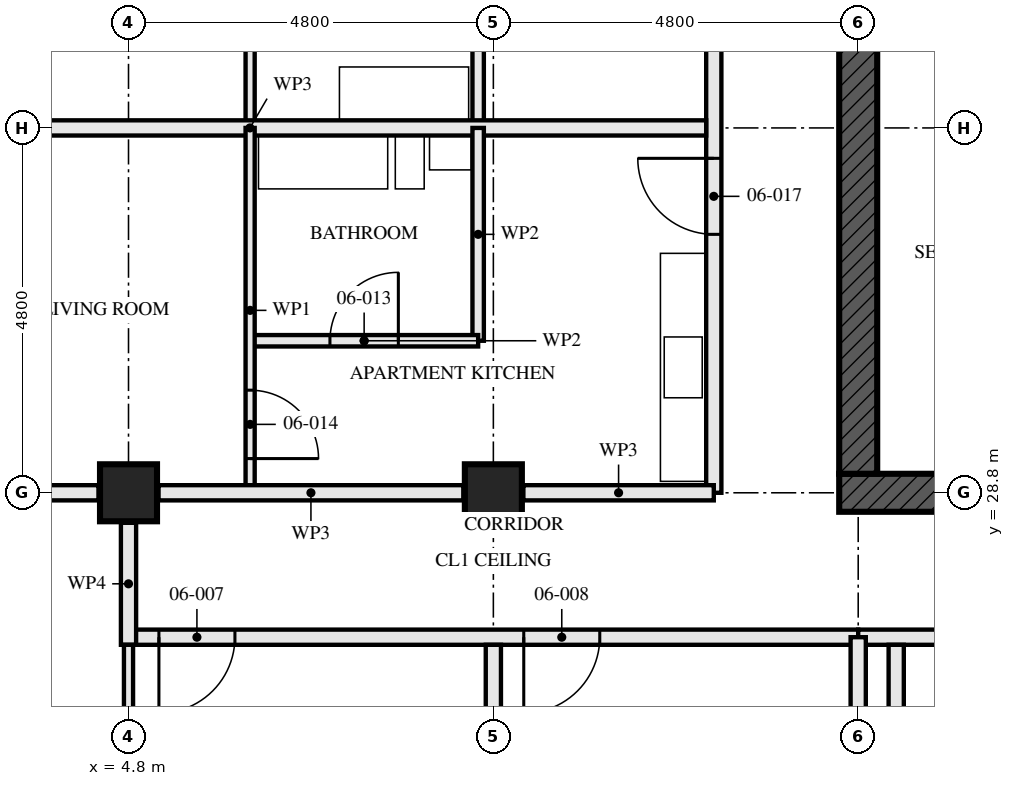
"""IFC4 building model, lengths in metres.
Left out: names, types, materials, properties, quantities, classifications, styles, units other than length and angle.
Written with IfcOpenShell. Run it as: python <this file> out.ifc"""

import sys

from ifc_helpers import new_model, si_unit, direction, frame, frame_2d, origin, origin_2d, place, context, subcontext, project, spatial, rectangle, hollow_rectangle, extrude, element, fill, save


model = new_model("IFC4")
c1 = context("Model", 3, precision=1e-05, world=origin(), true_north=direction((0.0, 1.0)))
c2 = subcontext(c1, "Body", "Model", "MODEL_VIEW")
j1 = project(units=[si_unit("LENGTHUNIT", "METRE"), si_unit("PLANEANGLEUNIT", "RADIAN")], contexts=[c1])
p1 = place(None, origin())
s1 = spatial("IfcSite", under=j1, at=p1, CompositionType="ELEMENT")
p2 = place(p1, origin())
s2 = spatial("IfcBuilding", under=s1, at=p2, CompositionType="ELEMENT")
p3 = place(p2, frame((0.0, 0.0, 27.0)))
s3 = spatial("IfcBuildingStorey", under=s2, at=p3, CompositionType="ELEMENT", Elevation=27.0)
for number, where, z_axis, x_axis in (
    (1, (4.8, 28.8, 0.0), (0.0, 0.0, 1.0), (0.0, 1.0, 0.0)),
    (2, (9.6, 28.8, 0.0), (0.0, 0.0, 1.0), (0.0, 1.0, 0.0)),
):
    element("IfcColumn", number, at=place(p3, frame(where, z_axis=z_axis, x_axis=x_axis)), inside=s3, PredefinedType="COLUMN", context=c2, shape_type="SweptSolid", body=[
        extrude(hollow_rectangle(XDim=0.75, YDim=0.75, WallThickness=0.08, at=origin_2d()), origin(), (0.0, 0.0, 1.0), 3.5),
    ])
p4 = place(p3, frame((14.15, 28.8, -0.17), z_axis=(0.0, 0.0, 1.0), x_axis=(1.0, 0.0, 0.0)))
e3 = element("IfcWall", 3, at=p4, inside=s3, PredefinedType="SHEAR", context=c2, shape_type="SweptSolid", body=[
    extrude(rectangle(XDim=14.9, YDim=0.5, at=frame_2d((7.45, 0.0))), origin(), (0.0, 0.0, 1.0), 3.5),
])
p5 = place(p4, frame((6.85, 0.0, 0.17)))
e4 = element("IfcOpeningElement", 4, at=p5, cuts=e3, PredefinedType="OPENING", context=c2, shape_type="SweptSolid", body=[
    extrude(rectangle(XDim=1.2, YDim=2.1, at=frame_2d((0.6, 1.05))), frame((0.0, 0.26, 0.0), z_axis=(0.0, -1.0, 0.0), x_axis=(1.0, 0.0, 0.0)), (0.0, 0.0, 1.0), 0.521),
])
p6 = place(p3, frame((14.4, 42.95, -0.17), z_axis=(0.0, 0.0, 1.0), x_axis=(0.0, -1.0, 0.0)))
e5 = element("IfcWall", 5, at=p6, inside=s3, PredefinedType="SHEAR", context=c2, shape_type="SweptSolid", body=[
    extrude(rectangle(XDim=13.9, YDim=0.5, at=frame_2d((6.95, 0.0))), origin(), (0.0, 0.0, 1.0), 3.5),
])
p7 = place(p6, frame((6.35, 0.0, 0.17)))
e6 = element("IfcOpeningElement", 6, at=p7, cuts=e5, PredefinedType="OPENING", context=c2, shape_type="SweptSolid", body=[
    extrude(rectangle(XDim=1.2, YDim=2.1, at=frame_2d((0.6, 1.05))), frame((0.0, 0.26, 0.0), z_axis=(0.0, -1.0, 0.0), x_axis=(1.0, 0.0, 0.0)), (0.0, 0.0, 1.0), 0.521),
])
p8 = place(p3, frame((4.8, 23.8, 0.0), z_axis=(0.0, 0.0, 1.0), x_axis=(0.0, 1.0, 0.0)))
e7 = element("IfcWall", 7, at=p8, inside=s3, PredefinedType="PARTITIONING", context=c2, shape_type="SweptSolid", body=[
    extrude(rectangle(XDim=3.0, YDim=0.12, at=frame_2d((1.5, 0.0))), origin(), (0.0, 0.0, 1.0), 2.55),
])
p9 = place(p8, frame((1.075, 0.0, 0.0)))
e8 = element("IfcOpeningElement", 8, at=p9, cuts=e7, PredefinedType="OPENING", context=c2, shape_type="SweptSolid", body=[
    extrude(rectangle(XDim=0.9, YDim=2.1, at=frame_2d((0.45, 1.05))), frame((0.0, 0.071, 0.0), z_axis=(0.0, -1.0, 0.0), x_axis=(1.0, 0.0, 0.0)), (0.0, 0.0, 1.0), 0.141),
])
p10 = place(p3, frame((9.6, 14.647, 0.0), z_axis=(0.0, 0.0, 1.0), x_axis=(0.0, 1.0, 0.0)))
e9 = element("IfcWall", 9, at=p10, inside=s3, PredefinedType="PARTITIONING", context=c2, shape_type="SweptSolid", body=[
    extrude(rectangle(XDim=12.153, YDim=0.2, at=frame_2d((6.077, 0.0))), origin(), (0.0, 0.0, 1.0), 2.55),
])
p11 = place(p3, frame((4.8, 26.9, 0.0), z_axis=(0.0, 0.0, 1.0), x_axis=(1.0, 0.0, 0.0)))
e10 = element("IfcWall", 10, at=p11, inside=s3, PredefinedType="PARTITIONING", context=c2, shape_type="SweptSolid", body=[
    extrude(rectangle(XDim=9.6, YDim=0.2, at=frame_2d((4.8, 0.0))), origin(), (0.0, 0.0, 1.0), 3.33),
])
p12 = place(p11, frame((0.4, 0.0, 0.0)))
e11 = element("IfcOpeningElement", 11, at=p12, cuts=e10, PredefinedType="OPENING", context=c2, shape_type="SweptSolid", body=[
    extrude(rectangle(XDim=1.0, YDim=2.1, at=frame_2d((0.5, 1.05))), frame((0.0, 0.111, 0.0), z_axis=(0.0, -1.0, 0.0), x_axis=(1.0, 0.0, 0.0)), (0.0, 0.0, 1.0), 0.221),
])
p13 = place(p11, frame((5.2, 0.0, 0.0)))
e12 = element("IfcOpeningElement", 12, at=p13, cuts=e10, PredefinedType="OPENING", context=c2, shape_type="SweptSolid", body=[
    extrude(rectangle(XDim=1.0, YDim=2.1, at=frame_2d((0.5, 1.05))), frame((0.0, 0.111, 0.0), z_axis=(0.0, -1.0, 0.0), x_axis=(1.0, 0.0, 0.0)), (0.0, 0.0, 1.0), 0.221),
])
p14 = place(p3, frame((4.8, 26.8, 0.0), z_axis=(0.0, 0.0, 1.0), x_axis=(0.0, 1.0, 0.0)))
e13 = element("IfcWall", 13, at=p14, inside=s3, PredefinedType="PARTITIONING", context=c2, shape_type="SweptSolid", body=[
    extrude(rectangle(XDim=1.605, YDim=0.2, at=frame_2d((0.802, 0.0))), origin(), (0.0, 0.0, 1.0), 3.33),
])
p15 = place(p3, frame((9.4, 36.4, 0.0), z_axis=(0.0, 0.0, 1.0), x_axis=(0.0, -1.0, 0.0)))
e14 = element("IfcWall", 14, at=p15, inside=s3, PredefinedType="PARTITIONING", context=c2, shape_type="SweptSolid", body=[
    extrude(rectangle(XDim=2.8, YDim=0.15, at=frame_2d((1.4, 0.0))), origin(), (0.0, 0.0, 1.0), 3.33),
])
p16 = place(p3, frame((6.4, 38.4, 0.0), z_axis=(0.0, 0.0, 1.0), x_axis=(0.0, -1.0, 0.0)))
e15 = element("IfcWall", 15, at=p16, inside=s3, PredefinedType="PARTITIONING", context=c2, shape_type="SweptSolid", body=[
    extrude(rectangle(XDim=4.8, YDim=0.12, at=frame_2d((2.4, 0.0))), origin(), (0.0, 0.0, 1.0), 3.33),
])
p17 = place(p16, frame((0.45, 0.0, 0.0)))
e16 = element("IfcOpeningElement", 16, at=p17, cuts=e15, PredefinedType="OPENING", context=c2, shape_type="SweptSolid", body=[
    extrude(rectangle(XDim=0.9, YDim=2.1, at=frame_2d((0.45, 1.05))), frame((0.0, 0.071, 0.0), z_axis=(0.0, -1.0, 0.0), x_axis=(1.0, 0.0, 0.0)), (0.0, 0.0, 1.0), 0.141),
])
p18 = place(p3, frame((0.395, 33.6, 0.0), z_axis=(0.0, 0.0, 1.0), x_axis=(1.0, 0.0, 0.0)))
e17 = element("IfcWall", 17, at=p18, inside=s3, PredefinedType="PARTITIONING", context=c2, shape_type="SweptSolid", body=[
    extrude(rectangle(XDim=12.005, YDim=0.2, at=frame_2d((6.002, 0.0))), origin(), (0.0, 0.0, 1.0), 2.55),
])
p19 = place(p3, frame((6.4, 30.8, 0.0), z_axis=(0.0, 0.0, 1.0), x_axis=(1.0, 0.0, 0.0)))
e18 = element("IfcWall", 18, at=p19, inside=s3, PredefinedType="PARTITIONING", context=c2, shape_type="SweptSolid", body=[
    extrude(rectangle(XDim=3.0, YDim=0.15, at=frame_2d((1.5, 0.0))), origin(), (0.0, 0.0, 1.0), 3.33),
])
p20 = place(p19, frame((1.05, 0.0, 0.0)))
e19 = element("IfcOpeningElement", 19, at=p20, cuts=e18, PredefinedType="OPENING", context=c2, shape_type="SweptSolid", body=[
    extrude(rectangle(XDim=0.9, YDim=2.1, at=frame_2d((0.45, 1.05))), frame((0.0, 0.085, 0.0), z_axis=(0.0, -1.0, 0.0), x_axis=(1.0, 0.0, 0.0)), (0.0, 0.0, 1.0), 0.171),
])
p21 = place(p3, frame((9.4, 33.6, 0.0), z_axis=(0.0, 0.0, 1.0), x_axis=(0.0, -1.0, 0.0)))
e20 = element("IfcWall", 20, at=p21, inside=s3, PredefinedType="PARTITIONING", context=c2, shape_type="SweptSolid", body=[
    extrude(rectangle(XDim=2.8, YDim=0.15, at=frame_2d((1.4, 0.0))), origin(), (0.0, 0.0, 1.0), 3.33),
])
p22 = place(p3, frame((6.4, 33.6, 0.0), z_axis=(0.0, 0.0, 1.0), x_axis=(0.0, -1.0, 0.0)))
e21 = element("IfcWall", 21, at=p22, inside=s3, PredefinedType="PARTITIONING", context=c2, shape_type="SweptSolid", body=[
    extrude(rectangle(XDim=4.8, YDim=0.12, at=frame_2d((2.4, 0.0))), origin(), (0.0, 0.0, 1.0), 3.33),
])
p23 = place(p22, frame((3.45, 0.0, 0.0)))
e22 = element("IfcOpeningElement", 22, at=p23, cuts=e21, PredefinedType="OPENING", context=c2, shape_type="SweptSolid", body=[
    extrude(rectangle(XDim=0.9, YDim=2.1, at=frame_2d((0.45, 1.05))), frame((0.0, 0.071, 0.0), z_axis=(0.0, -1.0, 0.0), x_axis=(1.0, 0.0, 0.0)), (0.0, 0.0, 1.0), 0.141),
])
p24 = place(p3, frame((12.5, 43.2, 0.0), z_axis=(0.0, 0.0, 1.0), x_axis=(0.0, -1.0, 0.0)))
e23 = element("IfcWall", 23, at=p24, inside=s3, PredefinedType="PARTITIONING", context=c2, shape_type="SweptSolid", body=[
    extrude(rectangle(XDim=14.4, YDim=0.2, at=frame_2d((7.2, 0.0))), origin(), (0.0, 0.0, 1.0), 2.55),
])
p25 = place(p24, frame((1.4, 0.0, 0.0)))
e24 = element("IfcOpeningElement", 24, at=p25, cuts=e23, PredefinedType="OPENING", context=c2, shape_type="SweptSolid", body=[
    extrude(rectangle(XDim=1.0, YDim=2.1, at=frame_2d((0.5, 1.05))), frame((0.0, 0.111, 0.0), z_axis=(0.0, -1.0, 0.0), x_axis=(1.0, 0.0, 0.0)), (0.0, 0.0, 1.0), 0.221),
])
p26 = place(p24, frame((5.2, 0.0, 0.0)))
e25 = element("IfcOpeningElement", 25, at=p26, cuts=e23, PredefinedType="OPENING", context=c2, shape_type="SweptSolid", body=[
    extrude(rectangle(XDim=1.0, YDim=2.1, at=frame_2d((0.5, 1.05))), frame((0.0, 0.111, 0.0), z_axis=(0.0, -1.0, 0.0), x_axis=(1.0, 0.0, 0.0)), (0.0, 0.0, 1.0), 0.221),
])
p27 = place(p24, frame((10.0, 0.0, 0.0)))
e26 = element("IfcOpeningElement", 26, at=p27, cuts=e23, PredefinedType="OPENING", context=c2, shape_type="SweptSolid", body=[
    extrude(rectangle(XDim=1.0, YDim=2.1, at=frame_2d((0.5, 1.05))), frame((0.0, 0.111, 0.0), z_axis=(0.0, -1.0, 0.0), x_axis=(1.0, 0.0, 0.0)), (0.0, 0.0, 1.0), 0.221),
])
p28 = place(p3, frame((14.9, 22.1, 0.0), z_axis=(0.0, 0.0, 1.0), x_axis=(0.0, 1.0, 0.0)))
e27 = element("IfcWall", 27, at=p28, inside=s3, PredefinedType="SOLIDWALL", context=c2, shape_type="SweptSolid", body=[
    extrude(rectangle(XDim=4.7, YDim=0.2, at=frame_2d((2.35, 0.0))), origin(), (0.0, 0.0, 1.0), 2.99),
])
p29 = place(p3, frame((14.4, 26.9, 0.0), z_axis=(0.0, 0.0, 1.0), x_axis=(1.0, 0.0, 0.0)))
e28 = element("IfcWall", 28, at=p29, inside=s3, PredefinedType="PARTITIONING", context=c2, shape_type="SweptSolid", body=[
    extrude(rectangle(XDim=14.4, YDim=0.2, at=frame_2d((7.2, 0.0))), origin(), (0.0, 0.0, 1.0), 2.55),
])
p30 = place(p29, frame((1.4, 0.0, 0.0)))
e29 = element("IfcOpeningElement", 29, at=p30, cuts=e28, PredefinedType="OPENING", context=c2, shape_type="SweptSolid", body=[
    extrude(rectangle(XDim=1.0, YDim=2.1, at=frame_2d((0.5, 1.05))), frame((0.0, 0.111, 0.0), z_axis=(0.0, -1.0, 0.0), x_axis=(1.0, 0.0, 0.0)), (0.0, 0.0, 1.0), 0.221),
])
p31 = place(p29, frame((5.2, 0.0, 0.0)))
e30 = element("IfcOpeningElement", 30, at=p31, cuts=e28, PredefinedType="OPENING", context=c2, shape_type="SweptSolid", body=[
    extrude(rectangle(XDim=1.0, YDim=2.1, at=frame_2d((0.5, 1.05))), frame((0.0, 0.111, 0.0), z_axis=(0.0, -1.0, 0.0), x_axis=(1.0, 0.0, 0.0)), (0.0, 0.0, 1.0), 0.221),
])
p32 = place(p29, frame((10.0, 0.0, 0.0)))
e31 = element("IfcOpeningElement", 31, at=p32, cuts=e28, PredefinedType="OPENING", context=c2, shape_type="SweptSolid", body=[
    extrude(rectangle(XDim=1.0, YDim=2.1, at=frame_2d((0.5, 1.05))), frame((0.0, 0.111, 0.0), z_axis=(0.0, -1.0, 0.0), x_axis=(1.0, 0.0, 0.0)), (0.0, 0.0, 1.0), 0.221),
])
p33 = place(p3, frame((12.5, 28.8, 0.0), z_axis=(0.0, 0.0, 1.0), x_axis=(-1.0, 0.0, 0.0)))
e32 = element("IfcWall", 32, at=p33, inside=s3, PredefinedType="PARTITIONING", context=c2, shape_type="SweptSolid", body=[
    extrude(rectangle(XDim=2.505, YDim=0.2, at=frame_2d((1.252, 0.0))), origin(), (0.0, 0.0, 1.0), 2.32),
])
p34 = place(p3, frame((9.205, 28.8, 0.0), z_axis=(0.0, 0.0, 1.0), x_axis=(-1.0, 0.0, 0.0)))
e33 = element("IfcWall", 33, at=p34, inside=s3, PredefinedType="PARTITIONING", context=c2, shape_type="SweptSolid", body=[
    extrude(rectangle(XDim=4.01, YDim=0.2, at=frame_2d((2.005, 0.0))), origin(), (0.0, 0.0, 1.0), 2.32),
])
p35 = place(p3, frame((4.405, 28.8, 0.0), z_axis=(0.0, 0.0, 1.0), x_axis=(-1.0, 0.0, 0.0)))
e34 = element("IfcWall", 34, at=p35, inside=s3, PredefinedType="PARTITIONING", context=c2, shape_type="SweptSolid", body=[
    extrude(rectangle(XDim=4.101, YDim=0.2, at=frame_2d((2.05, 0.0))), origin(), (0.0, 0.0, 1.0), 2.32),
])
p36 = place(p3, frame((14.4, 24.395, 0.0), z_axis=(0.0, 0.0, 1.0), x_axis=(0.0, 1.0, 0.0)))
e35 = element("IfcWall", 35, at=p36, inside=s3, PredefinedType="PARTITIONING", context=c2, shape_type="SweptSolid", body=[
    extrude(rectangle(XDim=2.505, YDim=0.2, at=frame_2d((1.252, 0.0))), origin(), (0.0, 0.0, 1.0), 2.32),
])
p37 = place(p12, frame((1.0, 0.0, 0.0), z_axis=(0.0, 0.0, 1.0), x_axis=(-1.0, 0.0, 0.0)))
e36 = element("IfcDoor", 36, at=p37, inside=s3, OperationType="SINGLE_SWING_LEFT", PredefinedType="DOOR", context=c2, shape_type="SweptSolid", body=[
    extrude(rectangle(XDim=1.0, YDim=2.1, at=frame_2d((0.5, 1.05))), frame((0.0, 0.027, 0.0), z_axis=(0.0, -1.0, 0.0), x_axis=(1.0, 0.0, 0.0)), (0.0, 0.0, 1.0), 0.054),
])
fill(e11, e36)
p38 = place(p13, frame((1.0, 0.0, 0.0), z_axis=(0.0, 0.0, 1.0), x_axis=(-1.0, 0.0, 0.0)))
e37 = element("IfcDoor", 37, at=p38, inside=s3, OperationType="SINGLE_SWING_LEFT", PredefinedType="DOOR", context=c2, shape_type="SweptSolid", body=[
    extrude(rectangle(XDim=1.0, YDim=2.1, at=frame_2d((0.5, 1.05))), frame((0.0, 0.027, 0.0), z_axis=(0.0, -1.0, 0.0), x_axis=(1.0, 0.0, 0.0)), (0.0, 0.0, 1.0), 0.054),
])
fill(e12, e37)
p39 = place(p20, origin())
e38 = element("IfcDoor", 38, at=p39, inside=s3, OperationType="SINGLE_SWING_LEFT", PredefinedType="DOOR", context=c2, shape_type="SweptSolid", body=[
    extrude(rectangle(XDim=0.9, YDim=2.1, at=frame_2d((0.45, 1.05))), frame((0.0, 0.022, 0.0), z_axis=(0.0, -1.0, 0.0), x_axis=(1.0, 0.0, 0.0)), (0.0, 0.0, 1.0), 0.044),
])
fill(e19, e38)
p40 = place(p23, origin())
e39 = element("IfcDoor", 39, at=p40, inside=s3, OperationType="SINGLE_SWING_LEFT", PredefinedType="DOOR", context=c2, shape_type="SweptSolid", body=[
    extrude(rectangle(XDim=0.9, YDim=2.1, at=frame_2d((0.45, 1.05))), frame((0.0, 0.022, 0.0), z_axis=(0.0, -1.0, 0.0), x_axis=(1.0, 0.0, 0.0)), (0.0, 0.0, 1.0), 0.044),
])
fill(e22, e39)
p41 = place(p27, frame((1.0, 0.0, 0.0), z_axis=(0.0, 0.0, 1.0), x_axis=(-1.0, 0.0, 0.0)))
e40 = element("IfcDoor", 40, at=p41, inside=s3, OperationType="SINGLE_SWING_LEFT", PredefinedType="DOOR", context=c2, shape_type="SweptSolid", body=[
    extrude(rectangle(XDim=1.0, YDim=2.1, at=frame_2d((0.5, 1.05))), frame((0.0, 0.027, 0.0), z_axis=(0.0, -1.0, 0.0), x_axis=(1.0, 0.0, 0.0)), (0.0, 0.0, 1.0), 0.054),
])
fill(e26, e40)
save(model, sys.argv[1])
